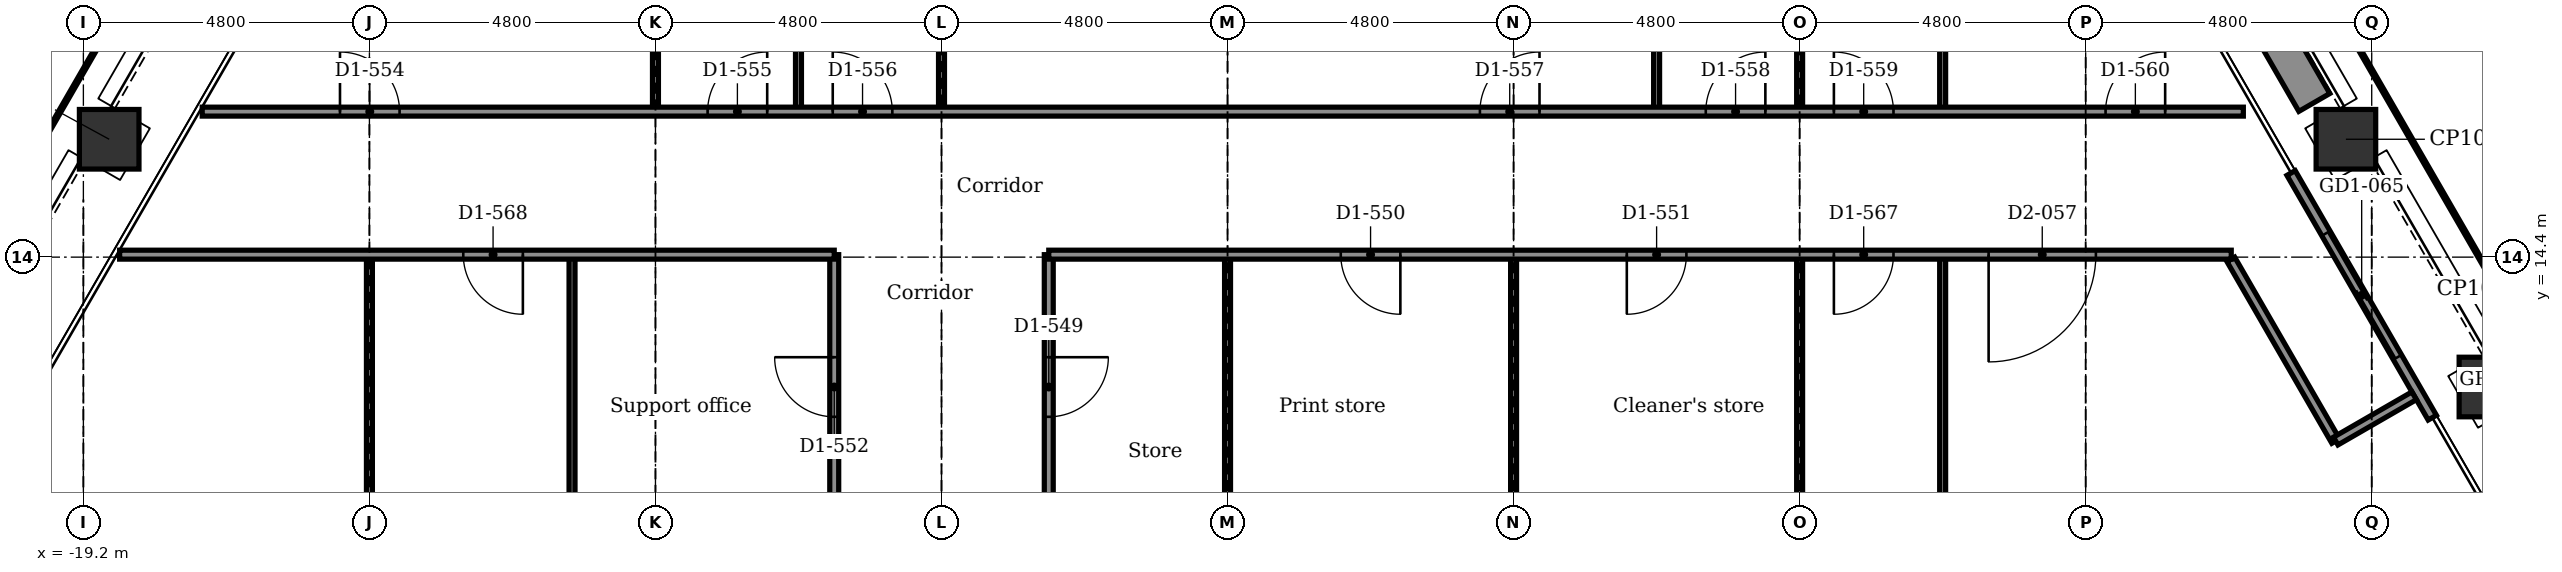
"""IFC4 building model, lengths in metres.
Left out: names, types, materials, properties, quantities, classifications, styles, units other than length and angle.
Written with IfcOpenShell. Run it as: python <this file> out.ifc"""

import sys

from ifc_helpers import new_model, si_unit, direction, frame, frame_2d, origin, origin_2d, place, context, subcontext, project, spatial, rectangle, extrude, element, fill, save


model = new_model("IFC4")
c1 = context("Model", 3, precision=1e-05, world=origin(), true_north=direction((0.0, 1.0)))
c2 = subcontext(c1, "Body", "Model", "MODEL_VIEW")
j1 = project(units=[si_unit("LENGTHUNIT", "METRE"), si_unit("PLANEANGLEUNIT", "RADIAN")], contexts=[c1])
p1 = place(None, origin())
s1 = spatial("IfcSite", under=j1, at=p1, CompositionType="ELEMENT")
p2 = place(p1, origin())
s2 = spatial("IfcBuilding", under=s1, at=p2, CompositionType="ELEMENT")
p3 = place(p2, frame((0.0, 0.0, 197.3)))
s3 = spatial("IfcBuildingStorey", under=s2, at=p3, CompositionType="ELEMENT", Elevation=197.3)
for number, where, z_axis, x_axis in (
    (1, (18.767, 16.378, -0.15), (0.0, 0.0, 1.0), (0.866, 0.5, 0.0)),
    (2, (21.167, 12.221, -0.15), (0.0, 0.0, 1.0), (0.866, 0.5, 0.0)),
    (3, (-18.767, 16.378, -0.15), (0.0, 0.0, 1.0), (0.5, 0.866, 0.0)),
):
    element("IfcColumn", number, at=place(p3, frame(where, z_axis=z_axis, x_axis=x_axis)), inside=s3, PredefinedType="COLUMN", context=c2, shape_type="SweptSolid", body=[
        extrude(rectangle(XDim=1.0, YDim=1.0, at=origin_2d()), origin(), (0.0, 0.0, 1.0), 3.9),
    ])
p4 = place(p3, frame((17.847, 15.812, 0.0), z_axis=(0.0, 0.0, 1.0), x_axis=(0.5000167099, -0.866015756104, 0.0)))
e4 = element("IfcWall", 4, at=p4, inside=s3, PredefinedType="PARTITIONING", context=c2, shape_type="SweptSolid", body=[
    extrude(rectangle(XDim=4.74, YDim=0.16, at=frame_2d((2.37, 0.0))), origin(), (0.0, 0.0, 1.0), 3.75),
])
p5 = place(p4, frame((1.17, 0.0, 0.0)))
e5 = element("IfcOpeningElement", 5, at=p5, cuts=e4, PredefinedType="OPENING", context=c2, shape_type="SweptSolid", body=[
    extrude(rectangle(XDim=2.4, YDim=2.4, at=frame_2d((1.2, 1.2))), frame((0.0, 0.09, 0.0), z_axis=(0.0, -1.0, 0.0), x_axis=(1.0, 0.0, 0.0)), (0.0, 0.0, 1.0), 0.18),
])
p6 = place(p3, frame((16.637, 19.767, 0.0), z_axis=(0.0, 0.0, 1.0), x_axis=(0.500028443584, -0.866008981251, 0.0)))
e6 = element("IfcWall", 6, at=p6, inside=s3, PredefinedType="USERDEFINED", context=c2, shape_type="SweptSolid", body=[
    extrude(rectangle(XDim=3.2, YDim=0.6, at=frame_2d((1.6, 0.0))), origin(), (0.0, 0.0, 1.0), 0.7),
])
p7 = place(p3, frame((12.0, -11.458, 0.0), z_axis=(0.0, 0.0, 1.0), x_axis=(0.0, 1.0, 0.0)))
e7 = element("IfcWall", 7, at=p7, inside=s3, PredefinedType="PARTITIONING", context=c2, shape_type="SweptSolid", body=[
    extrude(rectangle(XDim=25.9, YDim=0.1, at=frame_2d((12.95, 0.0))), origin(), (0.0, 0.0, 1.0), 3.75),
])
p8 = place(p3, frame((12.0, 16.842, 0.0), z_axis=(0.0, 0.0, 1.0), x_axis=(0.0, 1.0, 0.0)))
e8 = element("IfcWall", 8, at=p8, inside=s3, PredefinedType="PARTITIONING", context=c2, shape_type="SweptSolid", body=[
    extrude(rectangle(XDim=6.43, YDim=0.1, at=frame_2d((3.215, 0.0))), origin(), (0.0, 0.0, 1.0), 3.75),
])
p9 = place(p3, frame((9.6, 9.95, 0.0), z_axis=(0.0, 0.0, 1.0), x_axis=(0.0, 1.0, 0.0)))
e9 = element("IfcWall", 9, at=p9, inside=s3, PredefinedType="PARTITIONING", context=c2, shape_type="SweptSolid", body=[
    extrude(rectangle(XDim=4.491, YDim=0.1, at=frame_2d((2.246, 0.0))), origin(), (0.0, 0.0, 1.0), 3.066),
])
p10 = place(p3, frame((9.6, 16.842, 0.0), z_axis=(0.0, 0.0, 1.0), x_axis=(0.0, 1.0, 0.0)))
e10 = element("IfcWall", 10, at=p10, inside=s3, PredefinedType="PARTITIONING", context=c2, shape_type="SweptSolid", body=[
    extrude(rectangle(XDim=6.43, YDim=0.1, at=frame_2d((3.215, 0.0))), origin(), (0.0, 0.0, 1.0), 3.066),
])
p11 = place(p3, frame((7.2, 16.842, 0.0), z_axis=(0.0, 0.0, 1.0), x_axis=(0.0, 1.0, 0.0)))
e11 = element("IfcWall", 11, at=p11, inside=s3, PredefinedType="PARTITIONING", context=c2, shape_type="SweptSolid", body=[
    extrude(rectangle(XDim=6.43, YDim=0.1, at=frame_2d((3.215, 0.0))), origin(), (0.0, 0.0, 1.0), 3.75),
])
for number, where, z_axis, x_axis in (
    (12, (4.8, 9.95, 0.0), (0.0, 0.0, 1.0), (0.0, 1.0, 0.0)),
    (13, (0.0, 9.95, 0.0), (0.0, 0.0, 1.0), (0.0, 1.0, 0.0)),
):
    element("IfcWall", number, at=place(p3, frame(where, z_axis=z_axis, x_axis=x_axis)), inside=s3, PredefinedType="PARTITIONING", context=c2, shape_type="SweptSolid", body=[
        extrude(rectangle(XDim=4.491, YDim=0.1, at=frame_2d((2.246, 0.0))), origin(), (0.0, 0.0, 1.0), 3.066),
    ])
p12 = place(p3, frame((-3.0, 9.95, 0.0), z_axis=(0.0, 0.0, 1.0), x_axis=(0.0, 1.0, 0.0)))
e14 = element("IfcWall", 14, at=p12, inside=s3, PredefinedType="PARTITIONING", context=c2, shape_type="SweptSolid", body=[
    extrude(rectangle(XDim=4.491, YDim=0.15, at=frame_2d((2.246, 0.0))), origin(), (0.0, 0.0, 1.0), 3.75),
])
p13 = place(p12, frame((1.771, 0.0, 0.0)))
e15 = element("IfcOpeningElement", 15, at=p13, cuts=e14, PredefinedType="OPENING", context=c2, shape_type="SweptSolid", body=[
    extrude(rectangle(XDim=1.0, YDim=2.1, at=frame_2d((0.5, 1.05))), frame((0.0, 0.085, 0.0), z_axis=(0.0, -1.0, 0.0), x_axis=(1.0, 0.0, 0.0)), (0.0, 0.0, 1.0), 0.17),
])
p14 = place(p3, frame((-4.8, 16.842, 0.0), z_axis=(0.0, 0.0, 1.0), x_axis=(0.0, 1.0, 0.0)))
e16 = element("IfcWall", 16, at=p14, inside=s3, PredefinedType="PARTITIONING", context=c2, shape_type="SweptSolid", body=[
    extrude(rectangle(XDim=6.44, YDim=0.1, at=frame_2d((3.22, 0.0))), origin(), (0.0, 0.0, 1.0), 3.066),
])
p15 = place(p3, frame((-6.6, 10.15, 0.0), z_axis=(0.0, 0.0, 1.0), x_axis=(0.0, 1.0, 0.0)))
e17 = element("IfcWall", 17, at=p15, inside=s3, PredefinedType="PARTITIONING", context=c2, shape_type="SweptSolid", body=[
    extrude(rectangle(XDim=4.292, YDim=0.15, at=frame_2d((2.146, 0.0))), origin(), (0.0, 0.0, 1.0), 3.75),
])
p16 = place(p15, frame((1.571, 0.0, 0.0)))
e18 = element("IfcOpeningElement", 18, at=p16, cuts=e17, PredefinedType="OPENING", context=c2, shape_type="SweptSolid", body=[
    extrude(rectangle(XDim=1.0, YDim=2.1, at=frame_2d((0.5, 1.05))), frame((0.0, 0.085, 0.0), z_axis=(0.0, -1.0, 0.0), x_axis=(1.0, 0.0, 0.0)), (0.0, 0.0, 1.0), 0.17),
])
p17 = place(p3, frame((-7.2, 16.842, 0.0), z_axis=(0.0, 0.0, 1.0), x_axis=(0.0, 1.0, 0.0)))
e19 = element("IfcWall", 19, at=p17, inside=s3, PredefinedType="PARTITIONING", context=c2, shape_type="SweptSolid", body=[
    extrude(rectangle(XDim=6.43, YDim=0.1, at=frame_2d((3.215, 0.0))), origin(), (0.0, 0.0, 1.0), 3.75),
])
p18 = place(p3, frame((-9.6, 16.842, 0.0), z_axis=(0.0, 0.0, 1.0), x_axis=(0.0, 1.0, 0.0)))
e20 = element("IfcWall", 20, at=p18, inside=s3, PredefinedType="PARTITIONING", context=c2, shape_type="SweptSolid", body=[
    extrude(rectangle(XDim=6.43, YDim=0.1, at=frame_2d((3.215, 0.0))), origin(), (0.0, 0.0, 1.0), 3.066),
])
p19 = place(p3, frame((-11.0, 10.0, 0.0), z_axis=(0.0, 0.0, 1.0), x_axis=(0.0, 1.0, 0.0)))
e21 = element("IfcWall", 21, at=p19, inside=s3, PredefinedType="PARTITIONING", context=c2, shape_type="SweptSolid", body=[
    extrude(rectangle(XDim=4.441, YDim=0.1, at=frame_2d((2.221, 0.0))), origin(), (0.0, 0.0, 1.0), 3.75),
])
p20 = place(p3, frame((-14.4, 9.694, 0.0), z_axis=(0.0, 0.0, 1.0), x_axis=(0.0, 1.0, 0.0)))
e22 = element("IfcWall", 22, at=p20, inside=s3, PredefinedType="PARTITIONING", context=c2, shape_type="SweptSolid", body=[
    extrude(rectangle(XDim=4.748, YDim=0.1, at=frame_2d((2.374, 0.0))), origin(), (0.0, 0.0, 1.0), 3.066),
])
p21 = place(p3, frame((16.836, 14.362, 0.0), z_axis=(0.0, 0.0, 1.0), x_axis=(0.499980607609, -0.866036599697, 0.0)))
e23 = element("IfcWall", 23, at=p21, inside=s3, PredefinedType="PARTITIONING", context=c2, shape_type="SweptSolid", body=[
    extrude(rectangle(XDim=3.52, YDim=0.15, at=frame_2d((1.76, 0.0))), origin(), (0.0, 0.0, 1.0), 3.75),
])
p22 = place(p3, frame((18.596, 11.314, 0.0), z_axis=(0.0, 0.0, 1.0), x_axis=(0.866030456496, 0.499991248344, 0.0)))
e24 = element("IfcWall", 24, at=p22, inside=s3, PredefinedType="PARTITIONING", context=c2, shape_type="SweptSolid", body=[
    extrude(rectangle(XDim=1.52, YDim=0.15, at=frame_2d((0.76, 0.0))), origin(), (0.0, 0.0, 1.0), 3.75),
])
p23 = place(p3, frame((-18.592, 14.441, 0.0), z_axis=(0.0, 0.0, 1.0), x_axis=(1.0, 0.0, 0.0)))
e25 = element("IfcWall", 25, at=p23, inside=s3, PredefinedType="PARTITIONING", context=c2, shape_type="SweptSolid", body=[
    extrude(rectangle(XDim=11.991, YDim=0.15, at=frame_2d((5.996, 0.0))), origin(), (0.0, 0.0, 1.0), 3.75),
])
p24 = place(p23, frame((5.767, 0.0, 0.0)))
e26 = element("IfcOpeningElement", 26, at=p24, cuts=e25, PredefinedType="OPENING", context=c2, shape_type="SweptSolid", body=[
    extrude(rectangle(XDim=1.0, YDim=2.1, at=frame_2d((0.5, 1.05))), frame((0.0, 0.085, 0.0), z_axis=(0.0, -1.0, 0.0), x_axis=(1.0, 0.0, 0.0)), (0.0, 0.0, 1.0), 0.17),
])
p25 = place(p3, frame((-3.0, 14.441, 0.0), z_axis=(0.0, 0.0, 1.0), x_axis=(1.0, 0.0, 0.0)))
e27 = element("IfcWall", 27, at=p25, inside=s3, PredefinedType="PARTITIONING", context=c2, shape_type="SweptSolid", body=[
    extrude(rectangle(XDim=19.843, YDim=0.15, at=frame_2d((9.921, 0.0))), origin(), (0.0, 0.0, 1.0), 3.75),
])
p26 = place(p25, frame((4.9, 0.0, 0.0)))
e28 = element("IfcOpeningElement", 28, at=p26, cuts=e27, PredefinedType="OPENING", context=c2, shape_type="SweptSolid", body=[
    extrude(rectangle(XDim=1.0, YDim=2.1, at=frame_2d((0.5, 1.05))), frame((0.0, 0.085, 0.0), z_axis=(0.0, -1.0, 0.0), x_axis=(1.0, 0.0, 0.0)), (0.0, 0.0, 1.0), 0.17),
])
p27 = place(p25, frame((9.7, 0.0, 0.0)))
e29 = element("IfcOpeningElement", 29, at=p27, cuts=e27, PredefinedType="OPENING", context=c2, shape_type="SweptSolid", body=[
    extrude(rectangle(XDim=1.0, YDim=2.1, at=frame_2d((0.5, 1.05))), frame((0.0, 0.085, 0.0), z_axis=(0.0, -1.0, 0.0), x_axis=(1.0, 0.0, 0.0)), (0.0, 0.0, 1.0), 0.17),
])
p28 = place(p25, frame((13.175, 0.0, 0.0)))
e30 = element("IfcOpeningElement", 30, at=p28, cuts=e27, PredefinedType="OPENING", context=c2, shape_type="SweptSolid", body=[
    extrude(rectangle(XDim=1.0, YDim=2.1, at=frame_2d((0.5, 1.05))), frame((0.0, 0.085, 0.0), z_axis=(0.0, -1.0, 0.0), x_axis=(1.0, 0.0, 0.0)), (0.0, 0.0, 1.0), 0.17),
])
p29 = place(p25, frame((15.771, 0.0, 0.0)))
e31 = element("IfcOpeningElement", 31, at=p29, cuts=e27, PredefinedType="OPENING", context=c2, shape_type="SweptSolid", body=[
    extrude(rectangle(XDim=1.8, YDim=2.1, at=frame_2d((0.9, 1.05))), frame((0.0, 0.085, 0.0), z_axis=(0.0, -1.0, 0.0), x_axis=(1.0, 0.0, 0.0)), (0.0, 0.0, 1.0), 0.17),
])
p30 = place(p3, frame((-17.206, 16.842, 0.0), z_axis=(0.0, 0.0, 1.0), x_axis=(1.0, 0.0, 0.0)))
e32 = element("IfcWall", 32, at=p30, inside=s3, PredefinedType="PARTITIONING", context=c2, shape_type="SweptSolid", body=[
    extrude(rectangle(XDim=34.252, YDim=0.15, at=frame_2d((17.126, 0.0))), origin(), (0.0, 0.0, 1.0), 3.75),
])
p31 = place(p30, frame((2.312, 0.0, 0.0)))
e33 = element("IfcOpeningElement", 33, at=p31, cuts=e32, PredefinedType="OPENING", context=c2, shape_type="SweptSolid", body=[
    extrude(rectangle(XDim=1.0, YDim=2.1, at=frame_2d((0.5, 1.05))), frame((0.0, 0.085, 0.0), z_axis=(0.0, -1.0, 0.0), x_axis=(1.0, 0.0, 0.0)), (0.0, 0.0, 1.0), 0.17),
])
p32 = place(p30, frame((8.481, 0.0, 0.0)))
e34 = element("IfcOpeningElement", 34, at=p32, cuts=e32, PredefinedType="OPENING", context=c2, shape_type="SweptSolid", body=[
    extrude(rectangle(XDim=1.0, YDim=2.1, at=frame_2d((0.5, 1.05))), frame((0.0, 0.085, 0.0), z_axis=(0.0, -1.0, 0.0), x_axis=(1.0, 0.0, 0.0)), (0.0, 0.0, 1.0), 0.17),
])
p33 = place(p30, frame((10.581, 0.0, 0.0)))
e35 = element("IfcOpeningElement", 35, at=p33, cuts=e32, PredefinedType="OPENING", context=c2, shape_type="SweptSolid", body=[
    extrude(rectangle(XDim=1.0, YDim=2.1, at=frame_2d((0.5, 1.05))), frame((0.0, 0.085, 0.0), z_axis=(0.0, -1.0, 0.0), x_axis=(1.0, 0.0, 0.0)), (0.0, 0.0, 1.0), 0.17),
])
p34 = place(p30, frame((21.441, 0.0, 0.0)))
e36 = element("IfcOpeningElement", 36, at=p34, cuts=e32, PredefinedType="OPENING", context=c2, shape_type="SweptSolid", body=[
    extrude(rectangle(XDim=1.0, YDim=2.1, at=frame_2d((0.5, 1.05))), frame((0.0, 0.085, 0.0), z_axis=(0.0, -1.0, 0.0), x_axis=(1.0, 0.0, 0.0)), (0.0, 0.0, 1.0), 0.17),
])
p35 = place(p30, frame((25.231, 0.0, 0.0)))
e37 = element("IfcOpeningElement", 37, at=p35, cuts=e32, PredefinedType="OPENING", context=c2, shape_type="SweptSolid", body=[
    extrude(rectangle(XDim=1.0, YDim=2.1, at=frame_2d((0.5, 1.05))), frame((0.0, 0.085, 0.0), z_axis=(0.0, -1.0, 0.0), x_axis=(1.0, 0.0, 0.0)), (0.0, 0.0, 1.0), 0.17),
])
p36 = place(p30, frame((27.381, 0.0, 0.0)))
e38 = element("IfcOpeningElement", 38, at=p36, cuts=e32, PredefinedType="OPENING", context=c2, shape_type="SweptSolid", body=[
    extrude(rectangle(XDim=1.0, YDim=2.1, at=frame_2d((0.5, 1.05))), frame((0.0, 0.085, 0.0), z_axis=(0.0, -1.0, 0.0), x_axis=(1.0, 0.0, 0.0)), (0.0, 0.0, 1.0), 0.17),
])
p37 = place(p30, frame((31.94, 0.0, 0.0)))
e39 = element("IfcOpeningElement", 39, at=p37, cuts=e32, PredefinedType="OPENING", context=c2, shape_type="SweptSolid", body=[
    extrude(rectangle(XDim=1.0, YDim=2.1, at=frame_2d((0.5, 1.05))), frame((0.0, 0.085, 0.0), z_axis=(0.0, -1.0, 0.0), x_axis=(1.0, 0.0, 0.0)), (0.0, 0.0, 1.0), 0.17),
])
p38 = place(p5, origin())
e40 = element("IfcDoor", 40, at=p38, inside=s3, OperationType="DOUBLE_DOOR_SLIDING", PredefinedType="DOOR", context=c2, shape_type="SweptSolid", body=[
    extrude(rectangle(XDim=2.4, YDim=2.4, at=frame_2d((1.2, 1.2))), frame((0.0, 0.025, 0.0), z_axis=(0.0, -1.0, 0.0), x_axis=(1.0, 0.0, 0.0)), (0.0, 0.0, 1.0), 0.05),
])
fill(e5, e40)
p39 = place(p13, frame((1.0, 0.0, 0.0), z_axis=(0.0, 0.0, 1.0), x_axis=(-1.0, 0.0, 0.0)))
e41 = element("IfcDoor", 41, at=p39, inside=s3, OperationType="SINGLE_SWING_RIGHT", PredefinedType="DOOR", context=c2, shape_type="SweptSolid", body=[
    extrude(rectangle(XDim=1.0, YDim=2.1, at=frame_2d((0.5, 1.05))), frame((0.0, 0.025, 0.0), z_axis=(0.0, -1.0, 0.0), x_axis=(1.0, 0.0, 0.0)), (0.0, 0.0, 1.0), 0.05),
])
fill(e15, e41)
p40 = place(p26, frame((1.0, 0.0, 0.0), z_axis=(0.0, 0.0, 1.0), x_axis=(-1.0, 0.0, 0.0)))
e42 = element("IfcDoor", 42, at=p40, inside=s3, OperationType="SINGLE_SWING_RIGHT", PredefinedType="DOOR", context=c2, shape_type="SweptSolid", body=[
    extrude(rectangle(XDim=1.0, YDim=2.1, at=frame_2d((0.5, 1.05))), frame((0.0, 0.025, 0.0), z_axis=(0.0, -1.0, 0.0), x_axis=(1.0, 0.0, 0.0)), (0.0, 0.0, 1.0), 0.05),
])
fill(e28, e42)
p41 = place(p27, frame((1.0, 0.0, 0.0), z_axis=(0.0, 0.0, 1.0), x_axis=(-1.0, 0.0, 0.0)))
e43 = element("IfcDoor", 43, at=p41, inside=s3, OperationType="SINGLE_SWING_LEFT", PredefinedType="DOOR", context=c2, shape_type="SweptSolid", body=[
    extrude(rectangle(XDim=1.0, YDim=2.1, at=frame_2d((0.5, 1.05))), frame((0.0, 0.025, 0.0), z_axis=(0.0, -1.0, 0.0), x_axis=(1.0, 0.0, 0.0)), (0.0, 0.0, 1.0), 0.05),
])
fill(e29, e43)
p42 = place(p16, origin())
e44 = element("IfcDoor", 44, at=p42, inside=s3, OperationType="SINGLE_SWING_RIGHT", PredefinedType="DOOR", context=c2, shape_type="SweptSolid", body=[
    extrude(rectangle(XDim=1.0, YDim=2.1, at=frame_2d((0.5, 1.05))), frame((0.0, 0.025, 0.0), z_axis=(0.0, -1.0, 0.0), x_axis=(1.0, 0.0, 0.0)), (0.0, 0.0, 1.0), 0.05),
])
fill(e18, e44)
p43 = place(p31, origin())
e45 = element("IfcDoor", 45, at=p43, inside=s3, OperationType="SINGLE_SWING_LEFT", PredefinedType="DOOR", context=c2, shape_type="SweptSolid", body=[
    extrude(rectangle(XDim=1.0, YDim=2.1, at=frame_2d((0.5, 1.05))), frame((0.0, 0.025, 0.0), z_axis=(0.0, -1.0, 0.0), x_axis=(1.0, 0.0, 0.0)), (0.0, 0.0, 1.0), 0.05),
])
fill(e33, e45)
p44 = place(p32, origin())
e46 = element("IfcDoor", 46, at=p44, inside=s3, OperationType="SINGLE_SWING_RIGHT", PredefinedType="DOOR", context=c2, shape_type="SweptSolid", body=[
    extrude(rectangle(XDim=1.0, YDim=2.1, at=frame_2d((0.5, 1.05))), frame((0.0, 0.025, 0.0), z_axis=(0.0, -1.0, 0.0), x_axis=(1.0, 0.0, 0.0)), (0.0, 0.0, 1.0), 0.05),
])
fill(e34, e46)
p45 = place(p33, origin())
e47 = element("IfcDoor", 47, at=p45, inside=s3, OperationType="SINGLE_SWING_LEFT", PredefinedType="DOOR", context=c2, shape_type="SweptSolid", body=[
    extrude(rectangle(XDim=1.0, YDim=2.1, at=frame_2d((0.5, 1.05))), frame((0.0, 0.025, 0.0), z_axis=(0.0, -1.0, 0.0), x_axis=(1.0, 0.0, 0.0)), (0.0, 0.0, 1.0), 0.05),
])
fill(e35, e47)
p46 = place(p34, origin())
e48 = element("IfcDoor", 48, at=p46, inside=s3, OperationType="SINGLE_SWING_RIGHT", PredefinedType="DOOR", context=c2, shape_type="SweptSolid", body=[
    extrude(rectangle(XDim=1.0, YDim=2.1, at=frame_2d((0.5, 1.05))), frame((0.0, 0.025, 0.0), z_axis=(0.0, -1.0, 0.0), x_axis=(1.0, 0.0, 0.0)), (0.0, 0.0, 1.0), 0.05),
])
fill(e36, e48)
p47 = place(p35, origin())
e49 = element("IfcDoor", 49, at=p47, inside=s3, OperationType="SINGLE_SWING_RIGHT", PredefinedType="DOOR", context=c2, shape_type="SweptSolid", body=[
    extrude(rectangle(XDim=1.0, YDim=2.1, at=frame_2d((0.5, 1.05))), frame((0.0, 0.025, 0.0), z_axis=(0.0, -1.0, 0.0), x_axis=(1.0, 0.0, 0.0)), (0.0, 0.0, 1.0), 0.05),
])
fill(e37, e49)
p48 = place(p36, origin())
e50 = element("IfcDoor", 50, at=p48, inside=s3, OperationType="SINGLE_SWING_LEFT", PredefinedType="DOOR", context=c2, shape_type="SweptSolid", body=[
    extrude(rectangle(XDim=1.0, YDim=2.1, at=frame_2d((0.5, 1.05))), frame((0.0, 0.025, 0.0), z_axis=(0.0, -1.0, 0.0), x_axis=(1.0, 0.0, 0.0)), (0.0, 0.0, 1.0), 0.05),
])
fill(e38, e50)
p49 = place(p37, origin())
e51 = element("IfcDoor", 51, at=p49, inside=s3, OperationType="SINGLE_SWING_RIGHT", PredefinedType="DOOR", context=c2, shape_type="SweptSolid", body=[
    extrude(rectangle(XDim=1.0, YDim=2.1, at=frame_2d((0.5, 1.05))), frame((0.0, 0.025, 0.0), z_axis=(0.0, -1.0, 0.0), x_axis=(1.0, 0.0, 0.0)), (0.0, 0.0, 1.0), 0.05),
])
fill(e39, e51)
p50 = place(p28, frame((1.0, 0.0, 0.0), z_axis=(0.0, 0.0, 1.0), x_axis=(-1.0, 0.0, 0.0)))
e52 = element("IfcDoor", 52, at=p50, inside=s3, OperationType="SINGLE_SWING_LEFT", PredefinedType="DOOR", context=c2, shape_type="SweptSolid", body=[
    extrude(rectangle(XDim=1.0, YDim=2.1, at=frame_2d((0.5, 1.05))), frame((0.0, 0.025, 0.0), z_axis=(0.0, -1.0, 0.0), x_axis=(1.0, 0.0, 0.0)), (0.0, 0.0, 1.0), 0.05),
])
fill(e30, e52)
p51 = place(p29, frame((1.8, 0.0, 0.0), z_axis=(0.0, 0.0, 1.0), x_axis=(-1.0, 0.0, 0.0)))
e53 = element("IfcDoor", 53, at=p51, inside=s3, OperationType="SINGLE_SWING_LEFT", PredefinedType="DOOR", context=c2, shape_type="SweptSolid", body=[
    extrude(rectangle(XDim=1.8, YDim=2.1, at=frame_2d((0.9, 1.05))), frame((0.0, 0.025, 0.0), z_axis=(0.0, -1.0, 0.0), x_axis=(1.0, 0.0, 0.0)), (0.0, 0.0, 1.0), 0.05),
])
fill(e31, e53)
p52 = place(p24, frame((1.0, 0.0, 0.0), z_axis=(0.0, 0.0, 1.0), x_axis=(-1.0, 0.0, 0.0)))
e54 = element("IfcDoor", 54, at=p52, inside=s3, OperationType="SINGLE_SWING_RIGHT", PredefinedType="DOOR", context=c2, shape_type="SweptSolid", body=[
    extrude(rectangle(XDim=1.0, YDim=2.1, at=frame_2d((0.5, 1.05))), frame((0.0, 0.025, 0.0), z_axis=(0.0, -1.0, 0.0), x_axis=(1.0, 0.0, 0.0)), (0.0, 0.0, 1.0), 0.05),
])
fill(e26, e54)
save(model, sys.argv[1])
